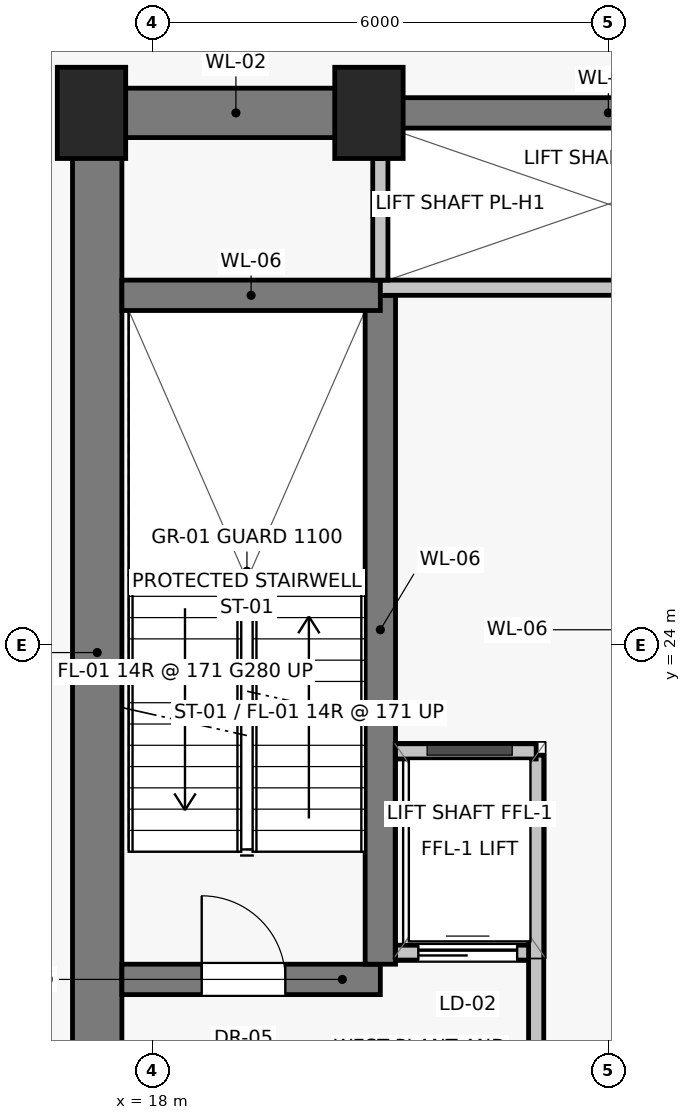
"""IFC4 building model, lengths in metres.
Left out: names, types, materials, properties, quantities, classifications, styles, units other than length and angle.
Written with IfcOpenShell. Run it as: python <this file> out.ifc"""

import sys

from ifc_helpers import new_model, si_unit, direction, frame, frame_2d, origin, origin_2d, place, context, subcontext, project, spatial, rectangle, extrude, source, transform, mapped, element, fill, save


model = new_model("IFC4")
c1 = context("Model", 3, precision=1e-05, world=origin(), true_north=direction((0.0, 1.0)))
c2 = subcontext(c1, "Body", "Model", "MODEL_VIEW")
j1 = project(units=[si_unit("LENGTHUNIT", "METRE"), si_unit("PLANEANGLEUNIT", "RADIAN")], contexts=[c1])
p1 = place(None, origin())
s1 = spatial("IfcSite", under=j1, at=p1, CompositionType="ELEMENT")
p2 = place(p1, origin())
s2 = spatial("IfcBuilding", under=s1, at=p2, CompositionType="ELEMENT")
p3 = place(p2, frame((0.0, 0.0, 169.55)))
s3 = spatial("IfcBuildingStorey", under=s2, at=p3, CompositionType="ELEMENT", Elevation=169.55)
for number, where, z_axis, x_axis in (
    (1, (17.2, 31.0, 0.0), (0.0, 0.0, 1.0), (1.0, 0.0, 0.0)),
    (2, (20.85, 31.0, 0.0), (0.0, 0.0, 1.0), (1.0, 0.0, 0.0)),
):
    element("IfcColumn", number, at=place(p3, frame(where, z_axis=z_axis, x_axis=x_axis)), inside=s3, PredefinedType="PILASTER", context=c2, shape_type="SweptSolid", body=[
        extrude(rectangle(XDim=0.9, YDim=1.2, at=origin_2d()), origin(), (0.0, 0.0, 1.0), 4.8),
    ])
p4 = place(p3, frame((17.275, 16.8, 0.0), z_axis=(0.0, 0.0, 1.0), x_axis=(0.0, 1.0, 0.0)))
e3 = element("IfcWall", 3, at=p4, inside=s3, PredefinedType="SHEAR", context=c2, shape_type="SweptSolid", body=[
    extrude(rectangle(XDim=14.2, YDim=0.65, at=frame_2d((7.1, 0.0))), origin(), (0.0, 0.0, 1.0), 4.48),
])
p5 = place(p3, frame((17.2, 31.0, 0.0), z_axis=(0.0, 0.0, 1.0), x_axis=(1.0, 0.0, 0.0)))
e4 = element("IfcWall", 4, at=p5, inside=s3, PredefinedType="SHEAR", context=c2, shape_type="SweptSolid", body=[
    extrude(rectangle(XDim=3.8, YDim=0.65, at=frame_2d((1.9, 0.0))), origin(), (0.0, 0.0, 1.0), 4.48),
])
p6 = place(p3, frame((21.0, 31.0, 0.0), z_axis=(0.0, 0.0, 1.0), x_axis=(1.0, 0.0, 0.0)))
e5 = element("IfcWall", 5, at=p6, inside=s3, PredefinedType="SHEAR", context=c2, shape_type="SweptSolid", body=[
    extrude(rectangle(XDim=6.0, YDim=0.4, at=frame_2d((3.0, 0.0))), origin(), (0.0, 0.0, 1.0), 4.48),
])
p7 = place(p3, frame((17.6, 19.6, 0.0), z_axis=(0.0, 0.0, 1.0), x_axis=(1.0, 0.0, 0.0)))
e6 = element("IfcWall", 6, at=p7, inside=s3, PredefinedType="SHEAR", context=c2, shape_type="SweptSolid", body=[
    extrude(rectangle(XDim=3.4, YDim=0.4, at=frame_2d((1.7, 0.0))), origin(), (0.0, 0.0, 1.0), 4.48),
])
p8 = place(p7, frame((1.05, 0.0, 0.0)))
e7 = element("IfcOpeningElement", 7, at=p8, cuts=e6, PredefinedType="OPENING", context=c2, shape_type="SweptSolid", body=[
    extrude(rectangle(XDim=1.1, YDim=2.03, at=frame_2d((0.55, 1.015))), frame((0.0, 0.21, 0.0), z_axis=(0.0, -1.0, 0.0), x_axis=(1.0, 0.0, 0.0)), (0.0, 0.0, 1.0), 0.42),
])
p9 = place(p3, frame((21.2, 19.95, 0.0), z_axis=(0.0, 0.0, 1.0), x_axis=(1.0, 0.0, 0.0)))
e8 = element("IfcWall", 8, at=p9, inside=s3, PredefinedType="SOLIDWALL", context=c2, shape_type="SweptSolid", body=[
    extrude(rectangle(XDim=1.85, YDim=0.2, at=frame_2d((0.925, 0.0))), origin(), (0.0, 0.0, 1.0), 4.48),
])
p10 = place(p9, frame((0.3, 0.0, 0.0)))
e9 = element("IfcOpeningElement", 9, at=p10, cuts=e8, PredefinedType="OPENING", context=c2, shape_type="SweptSolid", body=[
    extrude(rectangle(XDim=1.3, YDim=2.25, at=frame_2d((0.65, 1.125))), frame((0.0, 0.11, 0.0), z_axis=(0.0, -1.0, 0.0), x_axis=(1.0, 0.0, 0.0)), (0.0, 0.0, 1.0), 0.22),
])
p11 = place(p3, frame((21.0, 19.8, 0.0), z_axis=(0.0, 0.0, 1.0), x_axis=(0.0, 1.0, 0.0)))
e10 = element("IfcWall", 10, at=p11, inside=s3, PredefinedType="SHEAR", context=c2, shape_type="SweptSolid", body=[
    extrude(rectangle(XDim=8.8, YDim=0.4, at=frame_2d((4.4, 0.0))), origin(), (0.0, 0.0, 1.0), 4.48),
])
p12 = place(p3, frame((17.6, 28.6, 0.0), z_axis=(0.0, 0.0, 1.0), x_axis=(1.0, 0.0, 0.0)))
e11 = element("IfcWall", 11, at=p12, inside=s3, PredefinedType="SHEAR", context=c2, shape_type="SweptSolid", body=[
    extrude(rectangle(XDim=3.4, YDim=0.4, at=frame_2d((1.7, 0.0))), origin(), (0.0, 0.0, 1.0), 4.48),
])
p13 = place(p3, frame((23.05, 16.95, 0.0), z_axis=(0.0, 0.0, 1.0), x_axis=(0.0, 1.0, 0.0)))
e12 = element("IfcWall", 12, at=p13, inside=s3, PredefinedType="SOLIDWALL", context=c2, shape_type="SweptSolid", body=[
    extrude(rectangle(XDim=5.6, YDim=0.2, at=frame_2d((2.8, 0.0))), origin(), (0.0, 0.0, 1.0), 2.28),
])
p14 = place(p3, frame((21.2, 22.6, 0.0), z_axis=(0.0, 0.0, 1.0), x_axis=(1.0, 0.0, 0.0)))
e13 = element("IfcWall", 13, at=p14, inside=s3, PredefinedType="SOLIDWALL", context=c2, shape_type="SweptSolid", body=[
    extrude(rectangle(XDim=1.85, YDim=0.2, at=frame_2d((0.925, 0.0))), origin(), (0.0, 0.0, 1.0), 4.48),
])
p15 = place(p3, frame((21.0, 28.7, 0.0), z_axis=(0.0, 0.0, 1.0), x_axis=(1.0, 0.0, 0.0)))
e14 = element("IfcWall", 14, at=p15, inside=s3, PredefinedType="SOLIDWALL", context=c2, shape_type="SweptSolid", body=[
    extrude(rectangle(XDim=6.0, YDim=0.2, at=frame_2d((3.0, 0.0))), origin(), (0.0, 0.0, 1.0), 4.48),
])
p16 = place(p3, frame((21.0, 28.8, 0.0), z_axis=(0.0, 0.0, 1.0), x_axis=(0.0, 1.0, 0.0)))
e15 = element("IfcWall", 15, at=p16, inside=s3, PredefinedType="SOLIDWALL", context=c2, shape_type="SweptSolid", body=[
    extrude(rectangle(XDim=1.6, YDim=0.2, at=frame_2d((0.8, 0.0))), origin(), (0.0, 0.0, 1.0), 4.48),
])
m1 = source(origin(), c2, "Body", "SweptSolid", [
    extrude(rectangle(XDim=1.1, YDim=2.03, at=frame_2d((0.55, 1.015))), frame((0.0, 0.025, 0.0), z_axis=(0.0, -1.0, 0.0), x_axis=(1.0, 0.0, 0.0)), (0.0, 0.0, 1.0), 0.05),
])
p17 = place(p8, origin())
e16 = element("IfcDoor", 16, at=p17, inside=s3, OperationType="SINGLE_SWING_LEFT", PredefinedType="DOOR", context=c2, shape_type="MappedRepresentation", body=[
    mapped(m1, transform((0.0, 0.0, 0.0), scale=1.0)),
])
fill(e7, e16)
m2 = source(origin(), c2, "Body", "SweptSolid", [
    extrude(rectangle(XDim=1.3, YDim=2.25, at=frame_2d((0.65, 1.125))), frame((0.0, 0.025, 0.0), z_axis=(0.0, -1.0, 0.0), x_axis=(1.0, 0.0, 0.0)), (0.0, 0.0, 1.0), 0.05),
])
p18 = place(p10, origin())
e17 = element("IfcDoor", 17, at=p18, inside=s3, OperationType="SLIDING_TO_LEFT", PredefinedType="DOOR", context=c2, shape_type="MappedRepresentation", body=[
    mapped(m2, transform((0.0, 0.0, 0.0), scale=1.0)),
])
fill(e9, e17)
save(model, sys.argv[1])
